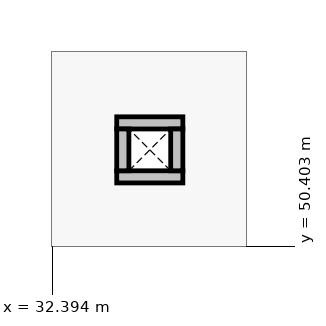
"""IFC4 building model, lengths in metres.
Left out: names, types, materials, properties, quantities, classifications, styles, units other than length and angle.
Written with IfcOpenShell. Run it as: python <this file> out.ifc"""

import sys

from ifc_helpers import new_model, si_unit, direction, frame, frame_2d, origin, place, context, subcontext, project, spatial, rectangle, extrude, element, save


model = new_model("IFC4")
c1 = context("Model", 3, precision=1e-05, world=origin(), true_north=direction((0.0, 1.0)))
c2 = subcontext(c1, "Body", "Model", "MODEL_VIEW")
j1 = project(units=[si_unit("LENGTHUNIT", "METRE"), si_unit("PLANEANGLEUNIT", "RADIAN")], contexts=[c1])
p1 = place(None, origin())
s1 = spatial("IfcSite", under=j1, at=p1, CompositionType="ELEMENT")
p2 = place(p1, origin())
s2 = spatial("IfcBuilding", under=s1, at=p2, CompositionType="ELEMENT")
p3 = place(p2, frame((0.0, 0.0, 4.8)))
s3 = spatial("IfcBuildingStorey", under=s2, at=p3, CompositionType="ELEMENT", Elevation=4.8)
for number, where, z_axis, x_axis in (
    (1, (33.24, 51.32, 0.0), (0.0, 0.0, 1.0), (1.0, 0.0, 0.0)),
    (2, (33.24, 52.03, 0.0), (0.0, 0.0, 1.0), (1.0, 0.0, 0.0)),
):
    element("IfcWall", number, at=place(p3, frame(where, z_axis=z_axis, x_axis=x_axis)), inside=s3, PredefinedType="PARTITIONING", context=c2, shape_type="SweptSolid", body=[
        extrude(rectangle(XDim=0.87, YDim=0.16, at=frame_2d((0.435, 0.0))), origin(), (0.0, 0.0, 1.0), 3.35),
    ])
for number, where, z_axis, x_axis in (
    (3, (33.32, 51.4, 0.0), (0.0, 0.0, 1.0), (0.0, 1.0, 0.0)),
    (4, (34.03, 51.4, 0.0), (0.0, 0.0, 1.0), (0.0, 1.0, 0.0)),
):
    element("IfcWall", number, at=place(p3, frame(where, z_axis=z_axis, x_axis=x_axis)), inside=s3, PredefinedType="PARTITIONING", context=c2, shape_type="SweptSolid", body=[
        extrude(rectangle(XDim=0.55, YDim=0.16, at=frame_2d((0.275, 0.0))), origin(), (0.0, 0.0, 1.0), 3.35),
    ])
save(model, sys.argv[1])
